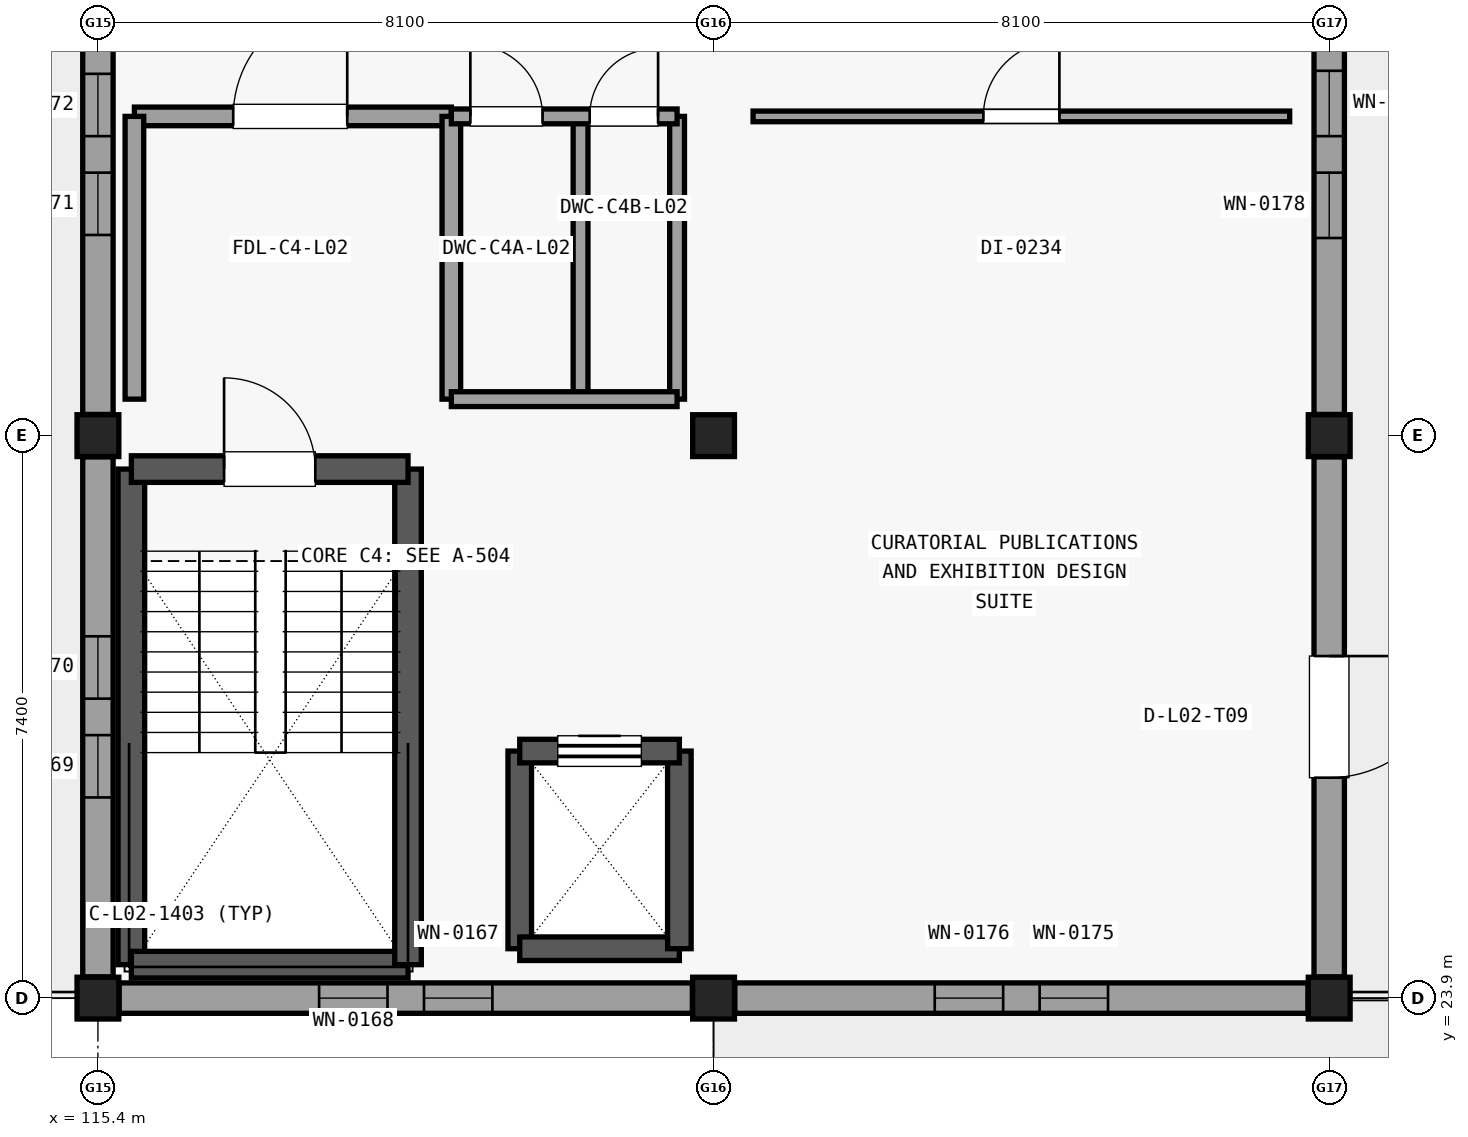
"""IFC4 building model, lengths in metres.
Left out: names, types, materials, properties, quantities, classifications, styles, units other than length and angle.
Written with IfcOpenShell. Run it as: python <this file> out.ifc"""

import sys

from ifc_helpers import new_model, si_unit, direction, frame, frame_2d, origin, origin_2d, place, context, subcontext, project, spatial, rectangle, extrude, element, fill, save


model = new_model("IFC4")
c1 = context("Model", 3, precision=1e-05, world=origin(), true_north=direction((0.0, 1.0)))
c2 = subcontext(c1, "Body", "Model", "MODEL_VIEW")
j1 = project(units=[si_unit("LENGTHUNIT", "METRE"), si_unit("PLANEANGLEUNIT", "RADIAN")], contexts=[c1])
p1 = place(None, origin())
s1 = spatial("IfcSite", under=j1, at=p1, CompositionType="ELEMENT")
p2 = place(p1, origin())
s2 = spatial("IfcBuilding", under=s1, at=p2, CompositionType="ELEMENT")
p3 = place(p2, frame((0.0, 0.0, 10.2)))
s3 = spatial("IfcBuildingStorey", under=s2, at=p3, CompositionType="ELEMENT", Elevation=10.2)
for number, where, z_axis, x_axis in (
    (1, (115.4, 23.9, 0.0), (0.0, 0.0, 1.0), (1.0, 0.0, 0.0)),
    (2, (115.4, 31.3, 0.0), (0.0, 0.0, 1.0), (1.0, 0.0, 0.0)),
    (3, (123.5, 23.9, 0.0), (0.0, 0.0, 1.0), (1.0, 0.0, 0.0)),
    (4, (123.5, 31.3, 0.0), (0.0, 0.0, 1.0), (1.0, 0.0, 0.0)),
    (5, (131.6, 23.9, 0.0), (0.0, 0.0, 1.0), (1.0, 0.0, 0.0)),
    (6, (131.6, 31.3, 0.0), (0.0, 0.0, 1.0), (1.0, 0.0, 0.0)),
):
    element("IfcColumn", number, at=place(p3, frame(where, z_axis=z_axis, x_axis=x_axis)), inside=s3, PredefinedType="COLUMN", context=c2, shape_type="SweptSolid", body=[
        extrude(rectangle(XDim=0.55, YDim=0.55, at=origin_2d()), origin(), (0.0, 0.0, 1.0), 3.37),
    ])
p4 = place(p3, frame((123.221, 23.9, 0.0), z_axis=(0.0, 0.0, 1.0), x_axis=(-1.0, 0.0, 0.0)))
e7 = element("IfcWall", 7, at=p4, inside=s3, PredefinedType="SOLIDWALL", context=c2, shape_type="SweptSolid", body=[
    extrude(rectangle(XDim=7.542, YDim=0.4, at=frame_2d((3.771, 0.0))), origin(), (0.0, 0.0, 1.0), 2.898),
])
p5 = place(p4, frame((2.631, 0.0, 0.6)))
e8 = element("IfcOpeningElement", 8, at=p5, cuts=e7, PredefinedType="OPENING", context=c2, shape_type="SweptSolid", body=[
    extrude(rectangle(XDim=0.9, YDim=1.98, at=frame_2d((0.45, 0.99))), frame((0.0, 0.21, 0.0), z_axis=(0.0, -1.0, 0.0), x_axis=(1.0, 0.0, 0.0)), (0.0, 0.0, 1.0), 0.42),
])
p6 = place(p4, frame((4.011, 0.0, 0.6)))
e9 = element("IfcOpeningElement", 9, at=p6, cuts=e7, PredefinedType="OPENING", context=c2, shape_type="SweptSolid", body=[
    extrude(rectangle(XDim=0.9, YDim=1.98, at=frame_2d((0.45, 0.99))), frame((0.0, 0.21, 0.0), z_axis=(0.0, -1.0, 0.0), x_axis=(1.0, 0.0, 0.0)), (0.0, 0.0, 1.0), 0.42),
])
p7 = place(p3, frame((115.4, 24.179, 0.0), z_axis=(0.0, 0.0, 1.0), x_axis=(0.0, 1.0, 0.0)))
e10 = element("IfcWall", 10, at=p7, inside=s3, PredefinedType="SOLIDWALL", context=c2, shape_type="SweptSolid", body=[
    extrude(rectangle(XDim=6.842, YDim=0.4, at=frame_2d((3.421, 0.0))), origin(), (0.0, 0.0, 1.0), 2.898),
])
p8 = place(p7, frame((2.361, 0.0, 0.6)))
e11 = element("IfcOpeningElement", 11, at=p8, cuts=e10, PredefinedType="OPENING", context=c2, shape_type="SweptSolid", body=[
    extrude(rectangle(XDim=0.82, YDim=2.0, at=frame_2d((0.41, 1.0))), frame((0.0, 0.21, 0.0), z_axis=(0.0, -1.0, 0.0), x_axis=(1.0, 0.0, 0.0)), (0.0, 0.0, 1.0), 0.42),
])
p9 = place(p7, frame((3.661, 0.0, 0.6)))
e12 = element("IfcOpeningElement", 12, at=p9, cuts=e10, PredefinedType="OPENING", context=c2, shape_type="SweptSolid", body=[
    extrude(rectangle(XDim=0.82, YDim=2.0, at=frame_2d((0.41, 1.0))), frame((0.0, 0.21, 0.0), z_axis=(0.0, -1.0, 0.0), x_axis=(1.0, 0.0, 0.0)), (0.0, 0.0, 1.0), 0.42),
])
p10 = place(p3, frame((115.4, 31.579, 0.0), z_axis=(0.0, 0.0, 1.0), x_axis=(0.0, 1.0, 0.0)))
e13 = element("IfcWall", 13, at=p10, inside=s3, PredefinedType="SOLIDWALL", context=c2, shape_type="SweptSolid", body=[
    extrude(rectangle(XDim=6.842, YDim=0.4, at=frame_2d((3.421, 0.0))), origin(), (0.0, 0.0, 1.0), 2.898),
])
p11 = place(p10, frame((2.361, 0.0, 0.6)))
e14 = element("IfcOpeningElement", 14, at=p11, cuts=e13, PredefinedType="OPENING", context=c2, shape_type="SweptSolid", body=[
    extrude(rectangle(XDim=0.82, YDim=2.0, at=frame_2d((0.41, 1.0))), frame((0.0, 0.21, 0.0), z_axis=(0.0, -1.0, 0.0), x_axis=(1.0, 0.0, 0.0)), (0.0, 0.0, 1.0), 0.42),
])
p12 = place(p10, frame((3.661, 0.0, 0.6)))
e15 = element("IfcOpeningElement", 15, at=p12, cuts=e13, PredefinedType="OPENING", context=c2, shape_type="SweptSolid", body=[
    extrude(rectangle(XDim=0.82, YDim=2.0, at=frame_2d((0.41, 1.0))), frame((0.0, 0.21, 0.0), z_axis=(0.0, -1.0, 0.0), x_axis=(1.0, 0.0, 0.0)), (0.0, 0.0, 1.0), 0.42),
])
p13 = place(p3, frame((131.321, 23.9, 0.0), z_axis=(0.0, 0.0, 1.0), x_axis=(-1.0, 0.0, 0.0)))
e16 = element("IfcWall", 16, at=p13, inside=s3, PredefinedType="SOLIDWALL", context=c2, shape_type="SweptSolid", body=[
    extrude(rectangle(XDim=7.542, YDim=0.4, at=frame_2d((3.771, 0.0))), origin(), (0.0, 0.0, 1.0), 2.898),
])
p14 = place(p13, frame((2.631, 0.0, 0.6)))
e17 = element("IfcOpeningElement", 17, at=p14, cuts=e16, PredefinedType="OPENING", context=c2, shape_type="SweptSolid", body=[
    extrude(rectangle(XDim=0.9, YDim=1.98, at=frame_2d((0.45, 0.99))), frame((0.0, 0.21, 0.0), z_axis=(0.0, -1.0, 0.0), x_axis=(1.0, 0.0, 0.0)), (0.0, 0.0, 1.0), 0.42),
])
p15 = place(p13, frame((4.011, 0.0, 0.6)))
e18 = element("IfcOpeningElement", 18, at=p15, cuts=e16, PredefinedType="OPENING", context=c2, shape_type="SweptSolid", body=[
    extrude(rectangle(XDim=0.9, YDim=1.98, at=frame_2d((0.45, 0.99))), frame((0.0, 0.21, 0.0), z_axis=(0.0, -1.0, 0.0), x_axis=(1.0, 0.0, 0.0)), (0.0, 0.0, 1.0), 0.42),
])
p16 = place(p3, frame((131.6, 31.021, 0.0), z_axis=(0.0, 0.0, 1.0), x_axis=(0.0, -1.0, 0.0)))
e19 = element("IfcWall", 19, at=p16, inside=s3, PredefinedType="SOLIDWALL", context=c2, shape_type="SweptSolid", body=[
    extrude(rectangle(XDim=6.842, YDim=0.4, at=frame_2d((3.421, 0.0))), origin(), (0.0, 0.0, 1.0), 2.898),
])
p17 = place(p16, frame((2.621, 0.0, 0.0)))
e20 = element("IfcOpeningElement", 20, at=p17, cuts=e19, PredefinedType="OPENING", context=c2, shape_type="SweptSolid", body=[
    extrude(rectangle(XDim=1.6, YDim=2.15, at=frame_2d((0.8, 1.075))), frame((0.0, 0.21, 0.0), z_axis=(0.0, -1.0, 0.0), x_axis=(1.0, 0.0, 0.0)), (0.0, 0.0, 1.0), 0.42),
])
p18 = place(p3, frame((131.6, 38.421, 0.0), z_axis=(0.0, 0.0, 1.0), x_axis=(0.0, -1.0, 0.0)))
e21 = element("IfcWall", 21, at=p18, inside=s3, PredefinedType="SOLIDWALL", context=c2, shape_type="SweptSolid", body=[
    extrude(rectangle(XDim=6.842, YDim=0.4, at=frame_2d((3.421, 0.0))), origin(), (0.0, 0.0, 1.0), 2.898),
])
p19 = place(p18, frame((2.321, 0.0, 0.6)))
e22 = element("IfcOpeningElement", 22, at=p19, cuts=e21, PredefinedType="OPENING", context=c2, shape_type="SweptSolid", body=[
    extrude(rectangle(XDim=0.86, YDim=2.05, at=frame_2d((0.43, 1.025))), frame((0.0, 0.21, 0.0), z_axis=(0.0, -1.0, 0.0), x_axis=(1.0, 0.0, 0.0)), (0.0, 0.0, 1.0), 0.42),
])
p20 = place(p18, frame((3.661, 0.0, 0.6)))
e23 = element("IfcOpeningElement", 23, at=p20, cuts=e21, PredefinedType="OPENING", context=c2, shape_type="SweptSolid", body=[
    extrude(rectangle(XDim=0.86, YDim=2.05, at=frame_2d((0.43, 1.025))), frame((0.0, 0.21, 0.0), z_axis=(0.0, -1.0, 0.0), x_axis=(1.0, 0.0, 0.0)), (0.0, 0.0, 1.0), 0.42),
])
p21 = place(p3, frame((115.84, 24.34, 0.0), z_axis=(0.0, 0.0, 1.0), x_axis=(0.0, 1.0, 0.0)))
e24 = element("IfcWall", 24, at=p21, inside=s3, PredefinedType="SHEAR", context=c2, shape_type="SweptSolid", body=[
    extrude(rectangle(XDim=6.52, YDim=0.35, at=frame_2d((3.26, 0.0))), origin(), (0.0, 0.0, 1.0), 3.365),
])
p22 = place(p3, frame((115.84, 24.34, 0.0), z_axis=(0.0, 0.0, 1.0), x_axis=(1.0, 0.0, 0.0)))
e25 = element("IfcWall", 25, at=p22, inside=s3, PredefinedType="SHEAR", context=c2, shape_type="SweptSolid", body=[
    extrude(rectangle(XDim=3.64, YDim=0.35, at=frame_2d((1.82, 0.0))), origin(), (0.0, 0.0, 1.0), 3.365),
])
p23 = place(p3, frame((119.48, 24.34, 0.0), z_axis=(0.0, 0.0, 1.0), x_axis=(0.0, 1.0, 0.0)))
e26 = element("IfcWall", 26, at=p23, inside=s3, PredefinedType="SHEAR", context=c2, shape_type="SweptSolid", body=[
    extrude(rectangle(XDim=6.52, YDim=0.35, at=frame_2d((3.26, 0.0))), origin(), (0.0, 0.0, 1.0), 3.365),
])
p24 = place(p3, frame((115.84, 30.86, 0.0), z_axis=(0.0, 0.0, 1.0), x_axis=(1.0, 0.0, 0.0)))
e27 = element("IfcWall", 27, at=p24, inside=s3, PredefinedType="SHEAR", context=c2, shape_type="SweptSolid", body=[
    extrude(rectangle(XDim=3.64, YDim=0.35, at=frame_2d((1.82, 0.0))), origin(), (0.0, 0.0, 1.0), 3.365),
])
p25 = place(p24, frame((1.22, 0.0, 0.0)))
e28 = element("IfcOpeningElement", 28, at=p25, cuts=e27, PredefinedType="OPENING", context=c2, shape_type="SweptSolid", body=[
    extrude(rectangle(XDim=1.2, YDim=2.15, at=frame_2d((0.6, 1.075))), frame((0.0, 0.185, 0.0), z_axis=(0.0, -1.0, 0.0), x_axis=(1.0, 0.0, 0.0)), (0.0, 0.0, 1.0), 0.37),
])
p26 = place(p3, frame((120.95, 24.55, 0.0), z_axis=(0.0, 0.0, 1.0), x_axis=(0.0, 1.0, 0.0)))
e29 = element("IfcWall", 29, at=p26, inside=s3, PredefinedType="SHEAR", context=c2, shape_type="SweptSolid", body=[
    extrude(rectangle(XDim=2.6, YDim=0.31, at=frame_2d((1.3, 0.0))), origin(), (0.0, 0.0, 1.0), 3.365),
])
p27 = place(p3, frame((120.95, 24.55, 0.0), z_axis=(0.0, 0.0, 1.0), x_axis=(1.0, 0.0, 0.0)))
e30 = element("IfcWall", 30, at=p27, inside=s3, PredefinedType="SHEAR", context=c2, shape_type="SweptSolid", body=[
    extrude(rectangle(XDim=2.1, YDim=0.31, at=frame_2d((1.05, 0.0))), origin(), (0.0, 0.0, 1.0), 3.365),
])
p28 = place(p3, frame((123.05, 24.55, 0.0), z_axis=(0.0, 0.0, 1.0), x_axis=(0.0, 1.0, 0.0)))
e31 = element("IfcWall", 31, at=p28, inside=s3, PredefinedType="SHEAR", context=c2, shape_type="SweptSolid", body=[
    extrude(rectangle(XDim=2.6, YDim=0.31, at=frame_2d((1.3, 0.0))), origin(), (0.0, 0.0, 1.0), 3.365),
])
p29 = place(p3, frame((120.95, 27.15, 0.0), z_axis=(0.0, 0.0, 1.0), x_axis=(1.0, 0.0, 0.0)))
e32 = element("IfcWall", 32, at=p29, inside=s3, PredefinedType="SHEAR", context=c2, shape_type="SweptSolid", body=[
    extrude(rectangle(XDim=2.1, YDim=0.31, at=frame_2d((1.05, 0.0))), origin(), (0.0, 0.0, 1.0), 3.365),
])
p30 = place(p29, frame((0.5, 0.0, 0.0)))
e33 = element("IfcOpeningElement", 33, at=p30, cuts=e32, PredefinedType="OPENING", context=c2, shape_type="SweptSolid", body=[
    extrude(rectangle(XDim=1.1, YDim=2.15, at=frame_2d((0.55, 1.075))), frame((0.0, 0.165, 0.0), z_axis=(0.0, -1.0, 0.0), x_axis=(1.0, 0.0, 0.0)), (0.0, 0.0, 1.0), 0.33),
])
p31 = place(p3, frame((115.88, 35.5, 0.0), z_axis=(0.0, 0.0, 1.0), x_axis=(1.0, 0.0, 0.0)))
e34 = element("IfcWall", 34, at=p31, inside=s3, PredefinedType="PARTITIONING", context=c2, shape_type="SweptSolid", body=[
    extrude(rectangle(XDim=4.17, YDim=0.245, at=frame_2d((2.085, 0.0))), origin(), (0.0, 0.0, 1.0), 2.903),
])
p32 = place(p31, frame((1.3, 0.0, 0.0)))
e35 = element("IfcOpeningElement", 35, at=p32, cuts=e34, PredefinedType="OPENING", context=c2, shape_type="SweptSolid", body=[
    extrude(rectangle(XDim=1.5, YDim=2.15, at=frame_2d((0.75, 1.075))), frame((0.0, 0.133, 0.0), z_axis=(0.0, -1.0, 0.0), x_axis=(1.0, 0.0, 0.0)), (0.0, 0.0, 1.0), 0.265),
])
for number, where, z_axis, x_axis in (
    (36, (115.88, 31.78, 0.0), (0.0, 0.0, 1.0), (0.0, 1.0, 0.0)),
    (37, (120.05, 31.78, 0.0), (0.0, 0.0, 1.0), (0.0, 1.0, 0.0)),
):
    element("IfcWall", number, at=place(p3, frame(where, z_axis=z_axis, x_axis=x_axis)), inside=s3, PredefinedType="PARTITIONING", context=c2, shape_type="SweptSolid", body=[
        extrude(rectangle(XDim=3.72, YDim=0.245, at=frame_2d((1.86, 0.0))), origin(), (0.0, 0.0, 1.0), 2.903),
    ])
for number, where, z_axis, x_axis in (
    (38, (121.75, 31.78, 0.0), (0.0, 0.0, 1.0), (0.0, 1.0, 0.0)),
    (39, (123.02, 31.78, 0.0), (0.0, 0.0, 1.0), (0.0, 1.0, 0.0)),
):
    element("IfcWall", number, at=place(p3, frame(where, z_axis=z_axis, x_axis=x_axis)), inside=s3, PredefinedType="PARTITIONING", context=c2, shape_type="SweptSolid", body=[
        extrude(rectangle(XDim=3.72, YDim=0.195, at=frame_2d((1.86, 0.0))), origin(), (0.0, 0.0, 1.0), 2.903),
    ])
p33 = place(p3, frame((120.05, 31.78, 0.0), z_axis=(0.0, 0.0, 1.0), x_axis=(1.0, 0.0, 0.0)))
e40 = element("IfcWall", 40, at=p33, inside=s3, PredefinedType="PARTITIONING", context=c2, shape_type="SweptSolid", body=[
    extrude(rectangle(XDim=2.97, YDim=0.195, at=frame_2d((1.485, 0.0))), origin(), (0.0, 0.0, 1.0), 2.903),
])
p34 = place(p3, frame((120.05, 35.5, 0.0), z_axis=(0.0, 0.0, 1.0), x_axis=(1.0, 0.0, 0.0)))
e41 = element("IfcWall", 41, at=p34, inside=s3, PredefinedType="PARTITIONING", context=c2, shape_type="SweptSolid", body=[
    extrude(rectangle(XDim=2.97, YDim=0.195, at=frame_2d((1.485, 0.0))), origin(), (0.0, 0.0, 1.0), 2.903),
])
p35 = place(p34, frame((0.25, 0.0, 0.0)))
e42 = element("IfcOpeningElement", 42, at=p35, cuts=e41, PredefinedType="OPENING", context=c2, shape_type="SweptSolid", body=[
    extrude(rectangle(XDim=0.95, YDim=2.1, at=frame_2d((0.475, 1.05))), frame((0.0, 0.107, 0.0), z_axis=(0.0, -1.0, 0.0), x_axis=(1.0, 0.0, 0.0)), (0.0, 0.0, 1.0), 0.215),
])
p36 = place(p34, frame((1.82, 0.0, 0.0)))
e43 = element("IfcOpeningElement", 43, at=p36, cuts=e41, PredefinedType="OPENING", context=c2, shape_type="SweptSolid", body=[
    extrude(rectangle(XDim=0.9, YDim=2.1, at=frame_2d((0.45, 1.05))), frame((0.0, 0.107, 0.0), z_axis=(0.0, -1.0, 0.0), x_axis=(1.0, 0.0, 0.0)), (0.0, 0.0, 1.0), 0.215),
])
p37 = place(p3, frame((124.02, 35.5, 0.0), z_axis=(0.0, 0.0, 1.0), x_axis=(1.0, 0.0, 0.0)))
e44 = element("IfcWall", 44, at=p37, inside=s3, PredefinedType="PARTITIONING", context=c2, shape_type="SweptSolid", body=[
    extrude(rectangle(XDim=7.06, YDim=0.14, at=frame_2d((3.53, 0.0))), origin(), (0.0, 0.0, 1.0), 2.903),
])
p38 = place(p37, frame((3.03, 0.0, 0.0)))
e45 = element("IfcOpeningElement", 45, at=p38, cuts=e44, PredefinedType="OPENING", context=c2, shape_type="SweptSolid", body=[
    extrude(rectangle(XDim=1.0, YDim=2.12, at=frame_2d((0.5, 1.06))), frame((0.0, 0.08, 0.0), z_axis=(0.0, -1.0, 0.0), x_axis=(1.0, 0.0, 0.0)), (0.0, 0.0, 1.0), 0.16),
])
p39 = place(p5, origin())
e46 = element("IfcWindow", 46, at=p39, inside=s3, PartitioningType="SINGLE_PANEL", PredefinedType="WINDOW", context=c2, shape_type="SweptSolid", body=[
    extrude(rectangle(XDim=0.9, YDim=1.98, at=frame_2d((0.45, 0.99))), frame((0.0, 0.03, 0.0), z_axis=(0.0, -1.0, 0.0), x_axis=(1.0, 0.0, 0.0)), (0.0, 0.0, 1.0), 0.06),
])
fill(e8, e46)
p40 = place(p6, origin())
e47 = element("IfcWindow", 47, at=p40, inside=s3, PartitioningType="SINGLE_PANEL", PredefinedType="WINDOW", context=c2, shape_type="SweptSolid", body=[
    extrude(rectangle(XDim=0.9, YDim=1.98, at=frame_2d((0.45, 0.99))), frame((0.0, 0.03, 0.0), z_axis=(0.0, -1.0, 0.0), x_axis=(1.0, 0.0, 0.0)), (0.0, 0.0, 1.0), 0.06),
])
fill(e9, e47)
p41 = place(p8, origin())
e48 = element("IfcWindow", 48, at=p41, inside=s3, PartitioningType="SINGLE_PANEL", PredefinedType="WINDOW", context=c2, shape_type="SweptSolid", body=[
    extrude(rectangle(XDim=0.82, YDim=2.0, at=frame_2d((0.41, 1.0))), frame((0.0, 0.03, 0.0), z_axis=(0.0, -1.0, 0.0), x_axis=(1.0, 0.0, 0.0)), (0.0, 0.0, 1.0), 0.06),
])
fill(e11, e48)
p42 = place(p9, origin())
e49 = element("IfcWindow", 49, at=p42, inside=s3, PartitioningType="SINGLE_PANEL", PredefinedType="WINDOW", context=c2, shape_type="SweptSolid", body=[
    extrude(rectangle(XDim=0.82, YDim=2.0, at=frame_2d((0.41, 1.0))), frame((0.0, 0.03, 0.0), z_axis=(0.0, -1.0, 0.0), x_axis=(1.0, 0.0, 0.0)), (0.0, 0.0, 1.0), 0.06),
])
fill(e12, e49)
p43 = place(p11, origin())
e50 = element("IfcWindow", 50, at=p43, inside=s3, PartitioningType="SINGLE_PANEL", PredefinedType="WINDOW", context=c2, shape_type="SweptSolid", body=[
    extrude(rectangle(XDim=0.82, YDim=2.0, at=frame_2d((0.41, 1.0))), frame((0.0, 0.03, 0.0), z_axis=(0.0, -1.0, 0.0), x_axis=(1.0, 0.0, 0.0)), (0.0, 0.0, 1.0), 0.06),
])
fill(e14, e50)
p44 = place(p12, origin())
e51 = element("IfcWindow", 51, at=p44, inside=s3, PartitioningType="SINGLE_PANEL", PredefinedType="WINDOW", context=c2, shape_type="SweptSolid", body=[
    extrude(rectangle(XDim=0.82, YDim=2.0, at=frame_2d((0.41, 1.0))), frame((0.0, 0.03, 0.0), z_axis=(0.0, -1.0, 0.0), x_axis=(1.0, 0.0, 0.0)), (0.0, 0.0, 1.0), 0.06),
])
fill(e15, e51)
p45 = place(p14, origin())
e52 = element("IfcWindow", 52, at=p45, inside=s3, PartitioningType="SINGLE_PANEL", PredefinedType="WINDOW", context=c2, shape_type="SweptSolid", body=[
    extrude(rectangle(XDim=0.9, YDim=1.98, at=frame_2d((0.45, 0.99))), frame((0.0, 0.03, 0.0), z_axis=(0.0, -1.0, 0.0), x_axis=(1.0, 0.0, 0.0)), (0.0, 0.0, 1.0), 0.06),
])
fill(e17, e52)
p46 = place(p15, origin())
e53 = element("IfcWindow", 53, at=p46, inside=s3, PartitioningType="SINGLE_PANEL", PredefinedType="WINDOW", context=c2, shape_type="SweptSolid", body=[
    extrude(rectangle(XDim=0.9, YDim=1.98, at=frame_2d((0.45, 0.99))), frame((0.0, 0.03, 0.0), z_axis=(0.0, -1.0, 0.0), x_axis=(1.0, 0.0, 0.0)), (0.0, 0.0, 1.0), 0.06),
])
fill(e18, e53)
p47 = place(p17, origin())
e54 = element("IfcDoor", 54, at=p47, inside=s3, OperationType="SINGLE_SWING_LEFT", PredefinedType="DOOR", context=c2, shape_type="SweptSolid", body=[
    extrude(rectangle(XDim=1.6, YDim=2.15, at=frame_2d((0.8, 1.075))), frame((0.0, 0.025, 0.0), z_axis=(0.0, -1.0, 0.0), x_axis=(1.0, 0.0, 0.0)), (0.0, 0.0, 1.0), 0.05),
])
fill(e20, e54)
p48 = place(p19, origin())
e55 = element("IfcWindow", 55, at=p48, inside=s3, PartitioningType="SINGLE_PANEL", PredefinedType="WINDOW", context=c2, shape_type="SweptSolid", body=[
    extrude(rectangle(XDim=0.86, YDim=2.05, at=frame_2d((0.43, 1.025))), frame((0.0, 0.03, 0.0), z_axis=(0.0, -1.0, 0.0), x_axis=(1.0, 0.0, 0.0)), (0.0, 0.0, 1.0), 0.06),
])
fill(e22, e55)
p49 = place(p20, origin())
e56 = element("IfcWindow", 56, at=p49, inside=s3, PartitioningType="SINGLE_PANEL", PredefinedType="WINDOW", context=c2, shape_type="SweptSolid", body=[
    extrude(rectangle(XDim=0.86, YDim=2.05, at=frame_2d((0.43, 1.025))), frame((0.0, 0.03, 0.0), z_axis=(0.0, -1.0, 0.0), x_axis=(1.0, 0.0, 0.0)), (0.0, 0.0, 1.0), 0.06),
])
fill(e23, e56)
p50 = place(p25, origin())
e57 = element("IfcDoor", 57, at=p50, inside=s3, OperationType="SINGLE_SWING_LEFT", PredefinedType="DOOR", context=c2, shape_type="SweptSolid", body=[
    extrude(rectangle(XDim=1.2, YDim=2.15, at=frame_2d((0.6, 1.075))), frame((0.0, 0.025, 0.0), z_axis=(0.0, -1.0, 0.0), x_axis=(1.0, 0.0, 0.0)), (0.0, 0.0, 1.0), 0.05),
])
fill(e28, e57)
p51 = place(p30, origin())
e58 = element("IfcDoor", 58, at=p51, inside=s3, OperationType="SLIDING_TO_RIGHT", PredefinedType="DOOR", context=c2, shape_type="SweptSolid", body=[
    extrude(rectangle(XDim=1.1, YDim=2.15, at=frame_2d((0.55, 1.075))), frame((0.0, 0.025, 0.0), z_axis=(0.0, -1.0, 0.0), x_axis=(1.0, 0.0, 0.0)), (0.0, 0.0, 1.0), 0.05),
])
fill(e33, e58)
p52 = place(p32, origin())
e59 = element("IfcDoor", 59, at=p52, inside=s3, OperationType="SINGLE_SWING_RIGHT", PredefinedType="DOOR", context=c2, shape_type="SweptSolid", body=[
    extrude(rectangle(XDim=1.5, YDim=2.15, at=frame_2d((0.75, 1.075))), frame((0.0, 0.025, 0.0), z_axis=(0.0, -1.0, 0.0), x_axis=(1.0, 0.0, 0.0)), (0.0, 0.0, 1.0), 0.05),
])
fill(e35, e59)
p53 = place(p35, origin())
e60 = element("IfcDoor", 60, at=p53, inside=s3, OperationType="SINGLE_SWING_LEFT", PredefinedType="DOOR", context=c2, shape_type="SweptSolid", body=[
    extrude(rectangle(XDim=0.95, YDim=2.1, at=frame_2d((0.475, 1.05))), frame((0.0, 0.025, 0.0), z_axis=(0.0, -1.0, 0.0), x_axis=(1.0, 0.0, 0.0)), (0.0, 0.0, 1.0), 0.05),
])
fill(e42, e60)
p54 = place(p36, origin())
e61 = element("IfcDoor", 61, at=p54, inside=s3, OperationType="SINGLE_SWING_RIGHT", PredefinedType="DOOR", context=c2, shape_type="SweptSolid", body=[
    extrude(rectangle(XDim=0.9, YDim=2.1, at=frame_2d((0.45, 1.05))), frame((0.0, 0.025, 0.0), z_axis=(0.0, -1.0, 0.0), x_axis=(1.0, 0.0, 0.0)), (0.0, 0.0, 1.0), 0.05),
])
fill(e43, e61)
p55 = place(p38, origin())
e62 = element("IfcDoor", 62, at=p55, inside=s3, OperationType="SINGLE_SWING_RIGHT", PredefinedType="DOOR", context=c2, shape_type="SweptSolid", body=[
    extrude(rectangle(XDim=1.0, YDim=2.12, at=frame_2d((0.5, 1.06))), frame((0.0, 0.025, 0.0), z_axis=(0.0, -1.0, 0.0), x_axis=(1.0, 0.0, 0.0)), (0.0, 0.0, 1.0), 0.05),
])
fill(e45, e62)
save(model, sys.argv[1])
